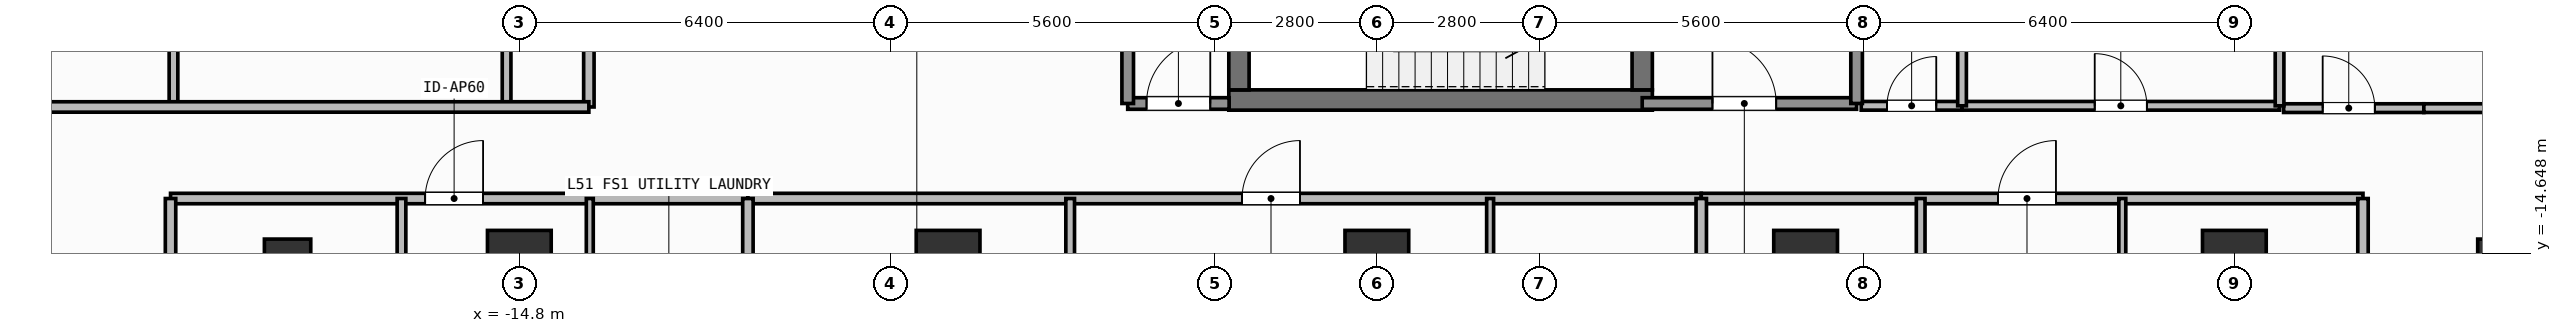
"""IFC4 building model, lengths in metres.
Left out: names, types, materials, properties, quantities, classifications, styles, units other than length and angle.
Written with IfcOpenShell. Run it as: python <this file> out.ifc"""

import sys

from ifc_helpers import new_model, si_unit, direction, frame, frame_2d, origin, origin_2d, place, context, subcontext, project, spatial, rectangle, hollow_rectangle, extrude, element, fill, save


model = new_model("IFC4")
c1 = context("Model", 3, precision=1e-05, world=origin(), true_north=direction((0.0, 1.0)))
c2 = subcontext(c1, "Body", "Model", "MODEL_VIEW")
j1 = project(units=[si_unit("LENGTHUNIT", "METRE"), si_unit("PLANEANGLEUNIT", "RADIAN")], contexts=[c1])
p1 = place(None, origin())
s1 = spatial("IfcSite", under=j1, at=p1, CompositionType="ELEMENT")
p2 = place(p1, origin())
s2 = spatial("IfcBuilding", under=s1, at=p2, CompositionType="ELEMENT")
p3 = place(p2, frame((0.0, 0.0, 207.0)))
s3 = spatial("IfcBuildingStorey", under=s2, at=p3, CompositionType="ELEMENT", Elevation=207.0)
p4 = place(p3, frame((-2.555, -12.0, 0.0), z_axis=(0.0, 0.0, 1.0), x_axis=(1.0, 0.0, 0.0)))
e1 = element("IfcWall", 1, at=p4, inside=s3, PredefinedType="SHEAR", context=c2, shape_type="SweptSolid", body=[
    extrude(rectangle(XDim=7.31, YDim=0.35, at=frame_2d((3.655, 0.0))), origin(), (0.0, 0.0, 1.0), 3.9),
])
p5 = place(p3, frame((-2.38, -11.825, 0.0), z_axis=(0.0, 0.0, 1.0), x_axis=(0.0, 1.0, 0.0)))
e2 = element("IfcWall", 2, at=p5, inside=s3, PredefinedType="SHEAR", context=c2, shape_type="SweptSolid", body=[
    extrude(rectangle(XDim=2.925, YDim=0.35, at=frame_2d((1.462, 0.0))), origin(), (0.0, 0.0, 1.0), 3.9),
])
p6 = place(p3, frame((4.58, -8.9, 0.0), z_axis=(0.0, 0.0, 1.0), x_axis=(0.0, -1.0, 0.0)))
e3 = element("IfcWall", 3, at=p6, inside=s3, PredefinedType="SHEAR", context=c2, shape_type="SweptSolid", body=[
    extrude(rectangle(XDim=2.925, YDim=0.35, at=frame_2d((1.462, 0.0))), origin(), (0.0, 0.0, 1.0), 3.9),
])
p7 = place(p6, frame((0.913, 0.0, 0.0)))
e4 = element("IfcOpeningElement", 4, at=p7, cuts=e3, PredefinedType="OPENING", context=c2, shape_type="SweptSolid", body=[
    extrude(rectangle(XDim=1.1, YDim=2.15, at=frame_2d((0.55, 1.075))), frame((0.0, 0.185, 0.0), z_axis=(0.0, -1.0, 0.0), x_axis=(1.0, 0.0, 0.0)), (0.0, 0.0, 1.0), 0.37),
])
for number, where, z_axis, x_axis in (
    (5, (-14.8, -14.8, 0.0), (0.0, 0.0, 1.0), (1.0, 0.0, 0.0)),
    (6, (-7.4, -14.8, 0.0), (0.0, 0.0, 1.0), (1.0, 0.0, 0.0)),
    (7, (0.0, -14.8, 0.0), (0.0, 0.0, 1.0), (1.0, 0.0, 0.0)),
    (8, (7.4, -14.8, 0.0), (0.0, 0.0, 1.0), (1.0, 0.0, 0.0)),
    (9, (14.8, -14.8, 0.0), (0.0, 0.0, 1.0), (1.0, 0.0, 0.0)),
):
    element("IfcColumn", number, at=place(p3, frame(where, z_axis=z_axis, x_axis=x_axis)), inside=s3, PredefinedType="COLUMN", context=c2, shape_type="SweptSolid", body=[
        extrude(rectangle(XDim=1.1, YDim=1.1, at=origin_2d()), origin(), (0.0, 0.0, 1.0), 3.9),
    ])
for number, where, z_axis, x_axis in (
    (10, (-18.8, -14.8, 0.0), (0.0, 0.0, 1.0), (1.0, 0.0, 0.0)),
    (11, (19.4, -14.8, 0.0), (0.0, 0.0, 1.0), (1.0, 0.0, 0.0)),
):
    element("IfcColumn", number, at=place(p3, frame(where, z_axis=z_axis, x_axis=x_axis)), inside=s3, PredefinedType="COLUMN", context=c2, shape_type="SweptSolid", body=[
        extrude(hollow_rectangle(XDim=0.8, YDim=0.8, WallThickness=0.036, at=origin_2d()), origin(), (0.0, 0.0, 1.0), 3.9),
    ])
p8 = place(p3, frame((4.58, -12.06, 0.0), z_axis=(0.0, 0.0, 1.0), x_axis=(1.0, 0.0, 0.0)))
e12 = element("IfcWall", 12, at=p8, inside=s3, PredefinedType="SOLIDWALL", context=c2, shape_type="SweptSolid", body=[
    extrude(rectangle(XDim=3.7, YDim=0.2, at=frame_2d((1.85, 0.0))), origin(), (0.0, 0.0, 1.0), 3.62),
])
p9 = place(p8, frame((1.212, 0.0, 0.0)))
e13 = element("IfcOpeningElement", 13, at=p9, cuts=e12, PredefinedType="OPENING", context=c2, shape_type="SweptSolid", body=[
    extrude(rectangle(XDim=1.1, YDim=2.15, at=frame_2d((0.55, 1.075))), frame((0.0, 0.11, 0.0), z_axis=(0.0, -1.0, 0.0), x_axis=(1.0, 0.0, 0.0)), (0.0, 0.0, 1.0), 0.22),
])
p10 = place(p3, frame((-4.3, -12.06, 0.0), z_axis=(0.0, 0.0, 1.0), x_axis=(1.0, 0.0, 0.0)))
e14 = element("IfcWall", 14, at=p10, inside=s3, PredefinedType="SOLIDWALL", context=c2, shape_type="SweptSolid", body=[
    extrude(rectangle(XDim=1.75, YDim=0.2, at=frame_2d((0.875, 0.0))), origin(), (0.0, 0.0, 1.0), 3.62),
])
p11 = place(p10, frame((0.325, 0.0, 0.0)))
e15 = element("IfcOpeningElement", 15, at=p11, cuts=e14, PredefinedType="OPENING", context=c2, shape_type="SweptSolid", body=[
    extrude(rectangle(XDim=1.1, YDim=2.15, at=frame_2d((0.55, 1.075))), frame((0.0, 0.11, 0.0), z_axis=(0.0, -1.0, 0.0), x_axis=(1.0, 0.0, 0.0)), (0.0, 0.0, 1.0), 0.22),
])
p12 = place(p3, frame((8.36, -12.1, 0.0), z_axis=(0.0, 0.0, 1.0), x_axis=(1.0, 0.0, 0.0)))
e16 = element("IfcWall", 16, at=p12, inside=s3, PredefinedType="PARTITIONING", context=c2, shape_type="SweptSolid", body=[
    extrude(rectangle(XDim=1.74, YDim=0.15, at=frame_2d((0.87, 0.0))), origin(), (0.0, 0.0, 1.0), 3.62),
])
p13 = place(p12, frame((0.445, 0.0, 0.0)))
e17 = element("IfcOpeningElement", 17, at=p13, cuts=e16, PredefinedType="OPENING", context=c2, shape_type="SweptSolid", body=[
    extrude(rectangle(XDim=0.85, YDim=2.1, at=frame_2d((0.425, 1.05))), frame((0.0, 0.085, 0.0), z_axis=(0.0, -1.0, 0.0), x_axis=(1.0, 0.0, 0.0)), (0.0, 0.0, 1.0), 0.17),
])
p14 = place(p3, frame((10.1, -12.1, 0.0), z_axis=(0.0, 0.0, 1.0), x_axis=(1.0, 0.0, 0.0)))
e18 = element("IfcWall", 18, at=p14, inside=s3, PredefinedType="PARTITIONING", context=c2, shape_type="SweptSolid", body=[
    extrude(rectangle(XDim=5.48, YDim=0.15, at=frame_2d((2.74, 0.0))), origin(), (0.0, 0.0, 1.0), 3.62),
])
p15 = place(p14, frame((2.29, 0.0, 0.0)))
e19 = element("IfcOpeningElement", 19, at=p15, cuts=e18, PredefinedType="OPENING", context=c2, shape_type="SweptSolid", body=[
    extrude(rectangle(XDim=0.9, YDim=2.1, at=frame_2d((0.45, 1.05))), frame((0.0, 0.085, 0.0), z_axis=(0.0, -1.0, 0.0), x_axis=(1.0, 0.0, 0.0)), (0.0, 0.0, 1.0), 0.17),
])
p16 = place(p3, frame((-20.82, -13.7, 0.0), z_axis=(0.0, 0.0, 1.0), x_axis=(1.0, 0.0, 0.0)))
e20 = element("IfcWall", 20, at=p16, inside=s3, PredefinedType="PARTITIONING", context=c2, shape_type="SweptSolid", body=[
    extrude(rectangle(XDim=9.965, YDim=0.18, at=frame_2d((4.982, 0.0))), origin(), (0.0, 0.0, 1.0), 3.62),
])
p17 = place(p16, frame((4.394, 0.0, 0.0)))
e21 = element("IfcOpeningElement", 21, at=p17, cuts=e20, PredefinedType="OPENING", context=c2, shape_type="SweptSolid", body=[
    extrude(rectangle(XDim=1.0, YDim=2.2, at=frame_2d((0.5, 1.1))), frame((0.0, 0.1, 0.0), z_axis=(0.0, -1.0, 0.0), x_axis=(1.0, 0.0, 0.0)), (0.0, 0.0, 1.0), 0.2),
])
p18 = place(p3, frame((-16.834, -24.39, 0.0), z_axis=(0.0, 0.0, 1.0), x_axis=(0.0, 1.0, 0.0)))
e22 = element("IfcWall", 22, at=p18, inside=s3, PredefinedType="PARTITIONING", context=c2, shape_type="SweptSolid", body=[
    extrude(rectangle(XDim=10.69, YDim=0.15, at=frame_2d((5.345, 0.0))), origin(), (0.0, 0.0, 1.0), 3.62),
])
p19 = place(p18, frame((4.83, 0.0, 0.0)))
e23 = element("IfcOpeningElement", 23, at=p19, cuts=e22, PredefinedType="OPENING", context=c2, shape_type="SweptSolid", body=[
    extrude(rectangle(XDim=0.85, YDim=2.1, at=frame_2d((0.425, 1.05))), frame((0.0, 0.085, 0.0), z_axis=(0.0, -1.0, 0.0), x_axis=(1.0, 0.0, 0.0)), (0.0, 0.0, 1.0), 0.17),
])
p20 = place(p3, frame((-13.584, -21.055, 0.0), z_axis=(0.0, 0.0, 1.0), x_axis=(0.0, 1.0, 0.0)))
e24 = element("IfcWall", 24, at=p20, inside=s3, PredefinedType="PARTITIONING", context=c2, shape_type="SweptSolid", body=[
    extrude(rectangle(XDim=7.355, YDim=0.12, at=frame_2d((3.677, 0.0))), origin(), (0.0, 0.0, 1.0), 3.62),
])
p21 = place(p20, frame((2.634, 0.0, 0.0)))
e25 = element("IfcOpeningElement", 25, at=p21, cuts=e24, PredefinedType="OPENING", context=c2, shape_type="SweptSolid", body=[
    extrude(rectangle(XDim=0.85, YDim=2.1, at=frame_2d((0.425, 1.05))), frame((0.0, 0.07, 0.0), z_axis=(0.0, -1.0, 0.0), x_axis=(1.0, 0.0, 0.0)), (0.0, 0.0, 1.0), 0.14),
])
p22 = place(p3, frame((-10.855, -13.7, 0.0), z_axis=(0.0, 0.0, 1.0), x_axis=(1.0, 0.0, 0.0)))
e26 = element("IfcWall", 26, at=p22, inside=s3, PredefinedType="PARTITIONING", context=c2, shape_type="SweptSolid", body=[
    extrude(rectangle(XDim=16.454, YDim=0.18, at=frame_2d((8.227, 0.0))), origin(), (0.0, 0.0, 1.0), 3.62),
])
p23 = place(p22, frame((8.528, 0.0, 0.0)))
e27 = element("IfcOpeningElement", 27, at=p23, cuts=e26, PredefinedType="OPENING", context=c2, shape_type="SweptSolid", body=[
    extrude(rectangle(XDim=1.0, YDim=2.2, at=frame_2d((0.5, 1.1))), frame((0.0, 0.1, 0.0), z_axis=(0.0, -1.0, 0.0), x_axis=(1.0, 0.0, 0.0)), (0.0, 0.0, 1.0), 0.2),
])
p24 = place(p3, frame((-5.293, -18.277, 0.0), z_axis=(0.0, 0.0, 1.0), x_axis=(0.0, 1.0, 0.0)))
e28 = element("IfcWall", 28, at=p24, inside=s3, PredefinedType="PARTITIONING", context=c2, shape_type="SweptSolid", body=[
    extrude(rectangle(XDim=4.577, YDim=0.15, at=frame_2d((2.289, 0.0))), origin(), (0.0, 0.0, 1.0), 3.62),
])
p25 = place(p24, frame((1.953, 0.0, 0.0)))
e29 = element("IfcOpeningElement", 29, at=p25, cuts=e28, PredefinedType="OPENING", context=c2, shape_type="SweptSolid", body=[
    extrude(rectangle(XDim=0.85, YDim=2.1, at=frame_2d((0.425, 1.05))), frame((0.0, 0.085, 0.0), z_axis=(0.0, -1.0, 0.0), x_axis=(1.0, 0.0, 0.0)), (0.0, 0.0, 1.0), 0.17),
])
p26 = place(p3, frame((1.955, -21.183, 0.0), z_axis=(0.0, 0.0, 1.0), x_axis=(0.0, 1.0, 0.0)))
e30 = element("IfcWall", 30, at=p26, inside=s3, PredefinedType="PARTITIONING", context=c2, shape_type="SweptSolid", body=[
    extrude(rectangle(XDim=7.483, YDim=0.12, at=frame_2d((3.742, 0.0))), origin(), (0.0, 0.0, 1.0), 3.62),
])
p27 = place(p26, frame((3.316, 0.0, 0.0)))
e31 = element("IfcOpeningElement", 31, at=p27, cuts=e30, PredefinedType="OPENING", context=c2, shape_type="SweptSolid", body=[
    extrude(rectangle(XDim=0.85, YDim=2.1, at=frame_2d((0.425, 1.05))), frame((0.0, 0.07, 0.0), z_axis=(0.0, -1.0, 0.0), x_axis=(1.0, 0.0, 0.0)), (0.0, 0.0, 1.0), 0.14),
])
p28 = place(p3, frame((5.599, -13.7, 0.0), z_axis=(0.0, 0.0, 1.0), x_axis=(1.0, 0.0, 0.0)))
e32 = element("IfcWall", 32, at=p28, inside=s3, PredefinedType="PARTITIONING", context=c2, shape_type="SweptSolid", body=[
    extrude(rectangle(XDim=11.421, YDim=0.18, at=frame_2d((5.71, 0.0))), origin(), (0.0, 0.0, 1.0), 3.62),
])
p29 = place(p28, frame((5.122, 0.0, 0.0)))
e33 = element("IfcOpeningElement", 33, at=p29, cuts=e32, PredefinedType="OPENING", context=c2, shape_type="SweptSolid", body=[
    extrude(rectangle(XDim=1.0, YDim=2.2, at=frame_2d((0.5, 1.1))), frame((0.0, 0.1, 0.0), z_axis=(0.0, -1.0, 0.0), x_axis=(1.0, 0.0, 0.0)), (0.0, 0.0, 1.0), 0.2),
])
p30 = place(p3, frame((9.386, -24.39, 0.0), z_axis=(0.0, 0.0, 1.0), x_axis=(0.0, 1.0, 0.0)))
e34 = element("IfcWall", 34, at=p30, inside=s3, PredefinedType="PARTITIONING", context=c2, shape_type="SweptSolid", body=[
    extrude(rectangle(XDim=10.69, YDim=0.15, at=frame_2d((5.345, 0.0))), origin(), (0.0, 0.0, 1.0), 3.62),
])
p31 = place(p30, frame((4.83, 0.0, 0.0)))
e35 = element("IfcOpeningElement", 35, at=p31, cuts=e34, PredefinedType="OPENING", context=c2, shape_type="SweptSolid", body=[
    extrude(rectangle(XDim=0.85, YDim=2.1, at=frame_2d((0.425, 1.05))), frame((0.0, 0.085, 0.0), z_axis=(0.0, -1.0, 0.0), x_axis=(1.0, 0.0, 0.0)), (0.0, 0.0, 1.0), 0.17),
])
p32 = place(p3, frame((12.866, -18.19, 0.0), z_axis=(0.0, 0.0, 1.0), x_axis=(0.0, 1.0, 0.0)))
e36 = element("IfcWall", 36, at=p32, inside=s3, PredefinedType="PARTITIONING", context=c2, shape_type="SweptSolid", body=[
    extrude(rectangle(XDim=4.49, YDim=0.12, at=frame_2d((2.245, 0.0))), origin(), (0.0, 0.0, 1.0), 3.62),
])
p33 = place(p32, frame((1.907, 0.0, 0.0)))
e37 = element("IfcOpeningElement", 37, at=p33, cuts=e36, PredefinedType="OPENING", context=c2, shape_type="SweptSolid", body=[
    extrude(rectangle(XDim=0.85, YDim=2.1, at=frame_2d((0.425, 1.05))), frame((0.0, 0.07, 0.0), z_axis=(0.0, -1.0, 0.0), x_axis=(1.0, 0.0, 0.0)), (0.0, 0.0, 1.0), 0.14),
])
p34 = place(p3, frame((-13.6, -12.12, 0.0), z_axis=(0.0, 0.0, 1.0), x_axis=(0.0, 1.0, 0.0)))
e38 = element("IfcWall", 38, at=p34, inside=s3, PredefinedType="PARTITIONING", context=c2, shape_type="SweptSolid", body=[
    extrude(rectangle(XDim=23.55, YDim=0.18, at=frame_2d((11.775, 0.0))), origin(), (0.0, 0.0, 1.0), 3.62),
])
p35 = place(p34, frame((11.454, 0.0, 0.0)))
e39 = element("IfcOpeningElement", 39, at=p35, cuts=e38, PredefinedType="OPENING", context=c2, shape_type="SweptSolid", body=[
    extrude(rectangle(XDim=1.0, YDim=2.2, at=frame_2d((0.5, 1.1))), frame((0.0, 0.1, 0.0), z_axis=(0.0, -1.0, 0.0), x_axis=(1.0, 0.0, 0.0)), (0.0, 0.0, 1.0), 0.2),
])
p36 = place(p3, frame((-15.02, -12.12, 0.0), z_axis=(0.0, 0.0, 1.0), x_axis=(0.0, 1.0, 0.0)))
e40 = element("IfcWall", 40, at=p36, inside=s3, PredefinedType="PARTITIONING", context=c2, shape_type="SweptSolid", body=[
    extrude(rectangle(XDim=6.711, YDim=0.15, at=frame_2d((3.355, 0.0))), origin(), (0.0, 0.0, 1.0), 3.122),
])
p37 = place(p36, frame((2.841, 0.0, 0.0)))
e41 = element("IfcOpeningElement", 41, at=p37, cuts=e40, PredefinedType="OPENING", context=c2, shape_type="SweptSolid", body=[
    extrude(rectangle(XDim=0.85, YDim=2.1, at=frame_2d((0.425, 1.05))), frame((0.0, 0.085, 0.0), z_axis=(0.0, -1.0, 0.0), x_axis=(1.0, 0.0, 0.0)), (0.0, 0.0, 1.0), 0.17),
])
p38 = place(p3, frame((15.65, -12.14, 0.0), z_axis=(0.0, 0.0, 1.0), x_axis=(1.0, 0.0, 0.0)))
e42 = element("IfcWall", 42, at=p38, inside=s3, PredefinedType="PARTITIONING", context=c2, shape_type="SweptSolid", body=[
    extrude(rectangle(XDim=2.42, YDim=0.15, at=frame_2d((1.21, 0.0))), origin(), (0.0, 0.0, 1.0), 3.62),
])
p39 = place(p38, frame((0.674, 0.0, 0.0)))
e43 = element("IfcOpeningElement", 43, at=p39, cuts=e42, PredefinedType="OPENING", context=c2, shape_type="SweptSolid", body=[
    extrude(rectangle(XDim=0.9, YDim=2.1, at=frame_2d((0.45, 1.05))), frame((0.0, 0.085, 0.0), z_axis=(0.0, -1.0, 0.0), x_axis=(1.0, 0.0, 0.0)), (0.0, 0.0, 1.0), 0.17),
])
for number, where, z_axis, x_axis in (
    (44, (8.28, -12.06, 0.0), (0.0, 0.0, 1.0), (0.0, 1.0, 0.0)),
    (45, (-4.3, -12.06, 0.0), (0.0, 0.0, 1.0), (0.0, 1.0, 0.0)),
):
    element("IfcWall", number, at=place(p3, frame(where, z_axis=z_axis, x_axis=x_axis)), inside=s3, PredefinedType="SOLIDWALL", context=c2, shape_type="SweptSolid", body=[
        extrude(rectangle(XDim=3.26, YDim=0.2, at=frame_2d((1.63, 0.0))), origin(), (0.0, 0.0, 1.0), 3.62),
    ])
p40 = place(p3, frame((10.1, -12.1, 0.0), z_axis=(0.0, 0.0, 1.0), x_axis=(0.0, 1.0, 0.0)))
e46 = element("IfcWall", 46, at=p40, inside=s3, PredefinedType="PARTITIONING", context=c2, shape_type="SweptSolid", body=[
    extrude(rectangle(XDim=2.35, YDim=0.15, at=frame_2d((1.175, 0.0))), origin(), (0.0, 0.0, 1.0), 3.62),
])
p41 = place(p3, frame((15.58, -12.1, 0.0), z_axis=(0.0, 0.0, 1.0), x_axis=(0.0, 1.0, 0.0)))
e47 = element("IfcWall", 47, at=p41, inside=s3, PredefinedType="PARTITIONING", context=c2, shape_type="SweptSolid", body=[
    extrude(rectangle(XDim=6.25, YDim=0.15, at=frame_2d((3.125, 0.0))), origin(), (0.0, 0.0, 1.0), 3.62),
])
for number, where, z_axis, x_axis in (
    (48, (-10.855, -28.63, 0.0), (0.0, 0.0, 1.0), (0.0, 1.0, 0.0)),
    (49, (5.599, -28.63, 0.0), (0.0, 0.0, 1.0), (0.0, 1.0, 0.0)),
):
    element("IfcWall", number, at=place(p3, frame(where, z_axis=z_axis, x_axis=x_axis)), inside=s3, PredefinedType="PARTITIONING", context=c2, shape_type="SweptSolid", body=[
        extrude(rectangle(XDim=14.93, YDim=0.18, at=frame_2d((7.465, 0.0))), origin(), (0.0, 0.0, 1.0), 3.62),
    ])
for number, where, z_axis, x_axis in (
    (50, (-20.82, -27.51, 0.0), (0.0, 0.0, 1.0), (0.0, 1.0, 0.0)),
    (51, (17.02, -27.51, 0.0), (0.0, 0.0, 1.0), (0.0, 1.0, 0.0)),
):
    element("IfcWall", number, at=place(p3, frame(where, z_axis=z_axis, x_axis=x_axis)), inside=s3, PredefinedType="PARTITIONING", context=c2, shape_type="SweptSolid", body=[
        extrude(rectangle(XDim=13.81, YDim=0.18, at=frame_2d((6.905, 0.0))), origin(), (0.0, 0.0, 1.0), 3.62),
    ])
p42 = place(p3, frame((-20.769, -12.12, 0.0), z_axis=(0.0, 0.0, 1.0), x_axis=(0.0, 1.0, 0.0)))
e52 = element("IfcWall", 52, at=p42, inside=s3, PredefinedType="PARTITIONING", context=c2, shape_type="SweptSolid", body=[
    extrude(rectangle(XDim=6.711, YDim=0.15, at=frame_2d((3.355, 0.0))), origin(), (0.0, 0.0, 1.0), 3.62),
])
p43 = place(p3, frame((-24.13, -12.12, 0.0), z_axis=(0.0, 0.0, 1.0), x_axis=(1.0, 0.0, 0.0)))
e53 = element("IfcWall", 53, at=p43, inside=s3, PredefinedType="PARTITIONING", context=c2, shape_type="SweptSolid", body=[
    extrude(rectangle(XDim=10.53, YDim=0.18, at=frame_2d((5.265, 0.0))), origin(), (0.0, 0.0, 1.0), 3.62),
])
p44 = place(p3, frame((18.07, -12.14, 0.0), z_axis=(0.0, 0.0, 1.0), x_axis=(1.0, 0.0, 0.0)))
e54 = element("IfcWall", 54, at=p44, inside=s3, PredefinedType="PARTITIONING", context=c2, shape_type="SweptSolid", body=[
    extrude(rectangle(XDim=2.26, YDim=0.15, at=frame_2d((1.13, 0.0))), origin(), (0.0, 0.0, 1.0), 3.62),
])
p45 = place(p9, origin())
e55 = element("IfcDoor", 55, at=p45, inside=s3, OperationType="SINGLE_SWING_LEFT", PredefinedType="DOOR", context=c2, shape_type="SweptSolid", body=[
    extrude(rectangle(XDim=1.1, YDim=2.15, at=frame_2d((0.55, 1.075))), frame((0.0, 0.025, 0.0), z_axis=(0.0, -1.0, 0.0), x_axis=(1.0, 0.0, 0.0)), (0.0, 0.0, 1.0), 0.05),
])
fill(e13, e55)
p46 = place(p11, origin())
e56 = element("IfcDoor", 56, at=p46, inside=s3, OperationType="SINGLE_SWING_RIGHT", PredefinedType="DOOR", context=c2, shape_type="SweptSolid", body=[
    extrude(rectangle(XDim=1.1, YDim=2.15, at=frame_2d((0.55, 1.075))), frame((0.0, 0.025, 0.0), z_axis=(0.0, -1.0, 0.0), x_axis=(1.0, 0.0, 0.0)), (0.0, 0.0, 1.0), 0.05),
])
fill(e15, e56)
p47 = place(p13, origin())
e57 = element("IfcDoor", 57, at=p47, inside=s3, OperationType="SINGLE_SWING_RIGHT", PredefinedType="DOOR", context=c2, shape_type="SweptSolid", body=[
    extrude(rectangle(XDim=0.85, YDim=2.1, at=frame_2d((0.425, 1.05))), frame((0.0, 0.025, 0.0), z_axis=(0.0, -1.0, 0.0), x_axis=(1.0, 0.0, 0.0)), (0.0, 0.0, 1.0), 0.05),
])
fill(e17, e57)
p48 = place(p15, origin())
e58 = element("IfcDoor", 58, at=p48, inside=s3, OperationType="SINGLE_SWING_LEFT", PredefinedType="DOOR", context=c2, shape_type="SweptSolid", body=[
    extrude(rectangle(XDim=0.9, YDim=2.1, at=frame_2d((0.45, 1.05))), frame((0.0, 0.025, 0.0), z_axis=(0.0, -1.0, 0.0), x_axis=(1.0, 0.0, 0.0)), (0.0, 0.0, 1.0), 0.05),
])
fill(e19, e58)
p49 = place(p17, origin())
e59 = element("IfcDoor", 59, at=p49, inside=s3, OperationType="SINGLE_SWING_RIGHT", PredefinedType="DOOR", context=c2, shape_type="SweptSolid", body=[
    extrude(rectangle(XDim=1.0, YDim=2.2, at=frame_2d((0.5, 1.1))), frame((0.0, 0.025, 0.0), z_axis=(0.0, -1.0, 0.0), x_axis=(1.0, 0.0, 0.0)), (0.0, 0.0, 1.0), 0.05),
])
fill(e21, e59)
p50 = place(p23, origin())
e60 = element("IfcDoor", 60, at=p50, inside=s3, OperationType="SINGLE_SWING_RIGHT", PredefinedType="DOOR", context=c2, shape_type="SweptSolid", body=[
    extrude(rectangle(XDim=1.0, YDim=2.2, at=frame_2d((0.5, 1.1))), frame((0.0, 0.025, 0.0), z_axis=(0.0, -1.0, 0.0), x_axis=(1.0, 0.0, 0.0)), (0.0, 0.0, 1.0), 0.05),
])
fill(e27, e60)
p51 = place(p29, origin())
e61 = element("IfcDoor", 61, at=p51, inside=s3, OperationType="SINGLE_SWING_RIGHT", PredefinedType="DOOR", context=c2, shape_type="SweptSolid", body=[
    extrude(rectangle(XDim=1.0, YDim=2.2, at=frame_2d((0.5, 1.1))), frame((0.0, 0.025, 0.0), z_axis=(0.0, -1.0, 0.0), x_axis=(1.0, 0.0, 0.0)), (0.0, 0.0, 1.0), 0.05),
])
fill(e33, e61)
p52 = place(p39, origin())
e62 = element("IfcDoor", 62, at=p52, inside=s3, OperationType="SINGLE_SWING_LEFT", PredefinedType="DOOR", context=c2, shape_type="SweptSolid", body=[
    extrude(rectangle(XDim=0.9, YDim=2.1, at=frame_2d((0.45, 1.05))), frame((0.0, 0.025, 0.0), z_axis=(0.0, -1.0, 0.0), x_axis=(1.0, 0.0, 0.0)), (0.0, 0.0, 1.0), 0.05),
])
fill(e43, e62)
save(model, sys.argv[1])
